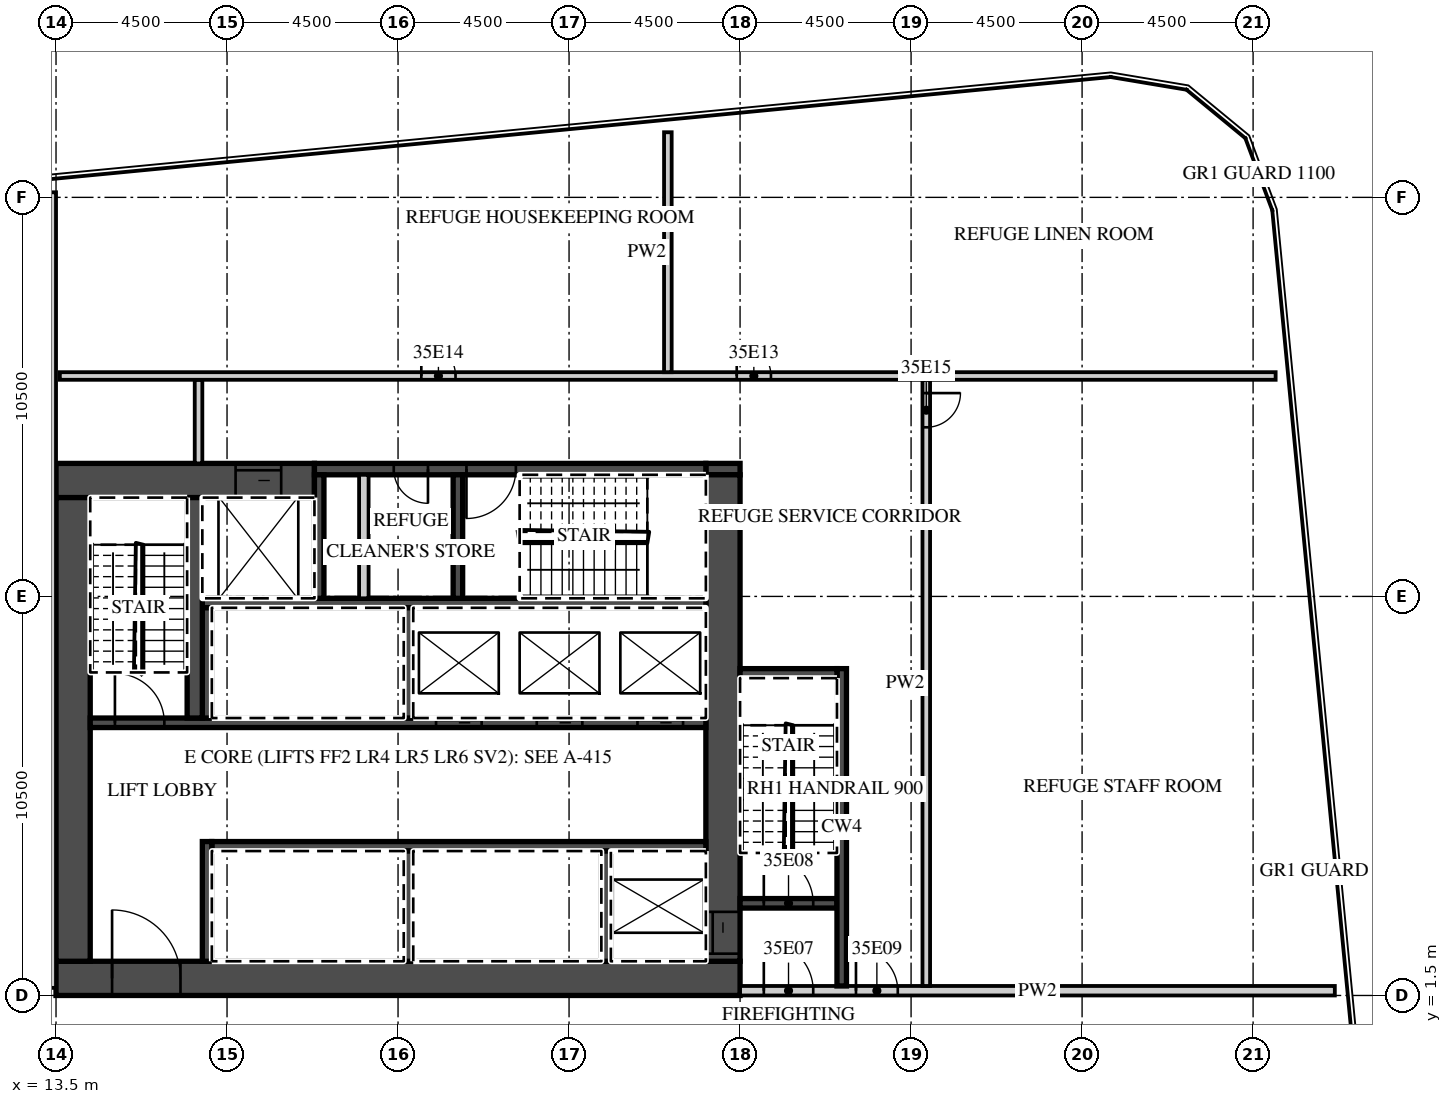
"""IFC4 building model, lengths in metres.
Left out: names, types, materials, properties, quantities, classifications, styles, units other than length and angle.
Written with IfcOpenShell. Run it as: python <this file> out.ifc"""

import sys

from ifc_helpers import new_model, si_unit, direction, frame, frame_2d, origin, place, context, subcontext, project, spatial, rectangle, extrude, element, fill, save


model = new_model("IFC4")
c1 = context("Model", 3, precision=1e-05, world=origin(), true_north=direction((0.0, 1.0)))
c2 = subcontext(c1, "Body", "Model", "MODEL_VIEW")
j1 = project(units=[si_unit("LENGTHUNIT", "METRE"), si_unit("PLANEANGLEUNIT", "RADIAN")], contexts=[c1])
p1 = place(None, origin())
s1 = spatial("IfcSite", under=j1, at=p1, CompositionType="ELEMENT")
p2 = place(p1, origin())
s2 = spatial("IfcBuilding", under=s1, at=p2, CompositionType="ELEMENT")
p3 = place(p2, frame((0.0, 0.0, 150.4)))
s3 = spatial("IfcBuildingStorey", under=s2, at=p3, CompositionType="ELEMENT", Elevation=150.4)
p4 = place(p3, frame((13.5, 1.95, 0.0), z_axis=(0.0, 0.0, 1.0), x_axis=(1.0, 0.0, 0.0)))
e1 = element("IfcWall", 1, at=p4, inside=s3, PredefinedType="SHEAR", context=c2, shape_type="SweptSolid", body=[
    extrude(rectangle(XDim=18.0, YDim=0.9, at=frame_2d((9.0, 0.0))), origin(), (0.0, 0.0, 1.0), 4.2),
])
p5 = place(p4, frame((1.475, 0.0, 0.0)))
e2 = element("IfcOpeningElement", 2, at=p5, cuts=e1, PredefinedType="OPENING", context=c2, shape_type="SweptSolid", body=[
    extrude(rectangle(XDim=1.8, YDim=2.1, at=frame_2d((0.9, 1.05))), frame((0.0, 0.46, 0.0), z_axis=(0.0, -1.0, 0.0), x_axis=(1.0, 0.0, 0.0)), (0.0, 0.0, 1.0), 0.92),
])
p6 = place(p3, frame((13.5, 15.05, 0.0), z_axis=(0.0, 0.0, 1.0), x_axis=(1.0, 0.0, 0.0)))
e3 = element("IfcWall", 3, at=p6, inside=s3, PredefinedType="SHEAR", context=c2, shape_type="SweptSolid", body=[
    extrude(rectangle(XDim=6.8, YDim=0.9, at=frame_2d((3.4, 0.0))), origin(), (0.0, 0.0, 1.0), 4.2),
])
p7 = place(p6, frame((4.725, 0.0, 0.0)))
e4 = element("IfcOpeningElement", 4, at=p7, cuts=e3, PredefinedType="OPENING", context=c2, shape_type="SweptSolid", body=[
    extrude(rectangle(XDim=1.2, YDim=2.1, at=frame_2d((0.6, 1.05))), frame((0.0, 0.46, 0.0), z_axis=(0.0, -1.0, 0.0), x_axis=(1.0, 0.0, 0.0)), (0.0, 0.0, 1.0), 0.92),
])
p8 = place(p3, frame((30.6, 15.35, 0.0), z_axis=(0.0, 0.0, 1.0), x_axis=(1.0, 0.0, 0.0)))
e5 = element("IfcWall", 5, at=p8, inside=s3, PredefinedType="SHEAR", context=c2, shape_type="SweptSolid", body=[
    extrude(rectangle(XDim=0.9, YDim=0.3, at=frame_2d((0.45, 0.0))), origin(), (0.0, 0.0, 1.0), 4.2),
])
p9 = place(p3, frame((20.3, 15.35, 0.0), z_axis=(0.0, 0.0, 1.0), x_axis=(1.0, 0.0, 0.0)))
e6 = element("IfcWall", 6, at=p9, inside=s3, PredefinedType="SHEAR", context=c2, shape_type="SweptSolid", body=[
    extrude(rectangle(XDim=10.3, YDim=0.3, at=frame_2d((5.15, 0.0))), origin(), (0.0, 0.0, 1.0), 4.2),
])
p10 = place(p9, frame((4.0, 0.0, 0.0)))
e7 = element("IfcOpeningElement", 7, at=p10, cuts=e6, PredefinedType="OPENING", context=c2, shape_type="SweptSolid", body=[
    extrude(rectangle(XDim=1.3, YDim=2.1, at=frame_2d((0.65, 1.05))), frame((0.0, 0.16, 0.0), z_axis=(0.0, -1.0, 0.0), x_axis=(1.0, 0.0, 0.0)), (0.0, 0.0, 1.0), 0.32),
])
p11 = place(p9, frame((2.087, 0.0, 0.0)))
e8 = element("IfcOpeningElement", 8, at=p11, cuts=e6, PredefinedType="OPENING", context=c2, shape_type="SweptSolid", body=[
    extrude(rectangle(XDim=0.9, YDim=2.1, at=frame_2d((0.45, 1.05))), frame((0.0, 0.16, 0.0), z_axis=(0.0, -1.0, 0.0), x_axis=(1.0, 0.0, 0.0)), (0.0, 0.0, 1.0), 0.32),
])
p12 = place(p3, frame((31.05, 2.4, 0.0), z_axis=(0.0, 0.0, 1.0), x_axis=(0.0, 1.0, 0.0)))
e9 = element("IfcWall", 9, at=p12, inside=s3, PredefinedType="SHEAR", context=c2, shape_type="SweptSolid", body=[
    extrude(rectangle(XDim=12.8, YDim=0.9, at=frame_2d((6.4, 0.0))), origin(), (0.0, 0.0, 1.0), 4.2),
])
p13 = place(p12, frame((0.2, 0.0, 0.0)))
e10 = element("IfcOpeningElement", 10, at=p13, cuts=e9, PredefinedType="OPENING", context=c2, shape_type="SweptSolid", body=[
    extrude(rectangle(XDim=1.1, YDim=2.1, at=frame_2d((0.55, 1.05))), frame((0.0, 0.46, 0.0), z_axis=(0.0, -1.0, 0.0), x_axis=(1.0, 0.0, 0.0)), (0.0, 0.0, 1.0), 0.92),
])
p14 = place(p3, frame((13.95, 2.4, 0.0), z_axis=(0.0, 0.0, 1.0), x_axis=(0.0, 1.0, 0.0)))
e11 = element("IfcWall", 11, at=p14, inside=s3, PredefinedType="SHEAR", context=c2, shape_type="SweptSolid", body=[
    extrude(rectangle(XDim=12.2, YDim=0.9, at=frame_2d((6.1, 0.0))), origin(), (0.0, 0.0, 1.0), 4.2),
])
p15 = place(p3, frame((17.6, 5.425, 0.0), z_axis=(0.0, 0.0, 1.0), x_axis=(1.0, 0.0, 0.0)))
e12 = element("IfcWall", 12, at=p15, inside=s3, PredefinedType="SHEAR", context=c2, shape_type="SweptSolid", body=[
    extrude(rectangle(XDim=13.0, YDim=0.25, at=frame_2d((6.5, 0.0))), origin(), (0.0, 0.0, 1.0), 4.2),
])
p16 = place(p3, frame((17.475, 2.4, 0.0), z_axis=(0.0, 0.0, 1.0), x_axis=(0.0, 1.0, 0.0)))
e13 = element("IfcWall", 13, at=p16, inside=s3, PredefinedType="SHEAR", context=c2, shape_type="SweptSolid", body=[
    extrude(rectangle(XDim=3.15, YDim=0.25, at=frame_2d((1.575, 0.0))), origin(), (0.0, 0.0, 1.0), 4.2),
])
for number, where, z_axis, x_axis in (
    (14, (27.975, 2.4, 0.0), (0.0, 0.0, 1.0), (0.0, 1.0, 0.0)),
    (15, (22.775, 2.4, 0.0), (0.0, 0.0, 1.0), (0.0, 1.0, 0.0)),
):
    element("IfcWall", number, at=place(p3, frame(where, z_axis=z_axis, x_axis=x_axis)), inside=s3, PredefinedType="SHEAR", context=c2, shape_type="SweptSolid", body=[
        extrude(rectangle(XDim=2.9, YDim=0.25, at=frame_2d((1.45, 0.0))), origin(), (0.0, 0.0, 1.0), 4.2),
    ])
p17 = place(p3, frame((14.4, 8.675, 0.0), z_axis=(0.0, 0.0, 1.0), x_axis=(1.0, 0.0, 0.0)))
e16 = element("IfcWall", 16, at=p17, inside=s3, PredefinedType="SHEAR", context=c2, shape_type="SweptSolid", body=[
    extrude(rectangle(XDim=16.2, YDim=0.25, at=frame_2d((8.1, 0.0))), origin(), (0.0, 0.0, 1.0), 4.2),
])
p18 = place(p17, frame((14.4, 0.0, 0.0)))
e17 = element("IfcOpeningElement", 17, at=p18, cuts=e16, PredefinedType="OPENING", context=c2, shape_type="SweptSolid", body=[
    extrude(rectangle(XDim=1.2, YDim=2.1, at=frame_2d((0.6, 1.05))), frame((0.0, 0.135, 0.0), z_axis=(0.0, -1.0, 0.0), x_axis=(1.0, 0.0, 0.0)), (0.0, 0.0, 1.0), 0.27),
])
p19 = place(p17, frame((11.75, 0.0, 0.0)))
e18 = element("IfcOpeningElement", 18, at=p19, cuts=e16, PredefinedType="OPENING", context=c2, shape_type="SweptSolid", body=[
    extrude(rectangle(XDim=1.2, YDim=2.1, at=frame_2d((0.6, 1.05))), frame((0.0, 0.135, 0.0), z_axis=(0.0, -1.0, 0.0), x_axis=(1.0, 0.0, 0.0)), (0.0, 0.0, 1.0), 0.27),
])
p20 = place(p17, frame((9.1, 0.0, 0.0)))
e19 = element("IfcOpeningElement", 19, at=p20, cuts=e16, PredefinedType="OPENING", context=c2, shape_type="SweptSolid", body=[
    extrude(rectangle(XDim=1.2, YDim=2.1, at=frame_2d((0.6, 1.05))), frame((0.0, 0.135, 0.0), z_axis=(0.0, -1.0, 0.0), x_axis=(1.0, 0.0, 0.0)), (0.0, 0.0, 1.0), 0.27),
])
p21 = place(p17, frame((0.65, 0.0, 0.0)))
e20 = element("IfcOpeningElement", 20, at=p21, cuts=e16, PredefinedType="OPENING", context=c2, shape_type="SweptSolid", body=[
    extrude(rectangle(XDim=1.3, YDim=2.1, at=frame_2d((0.65, 1.05))), frame((0.0, 0.135, 0.0), z_axis=(0.0, -1.0, 0.0), x_axis=(1.0, 0.0, 0.0)), (0.0, 0.0, 1.0), 0.27),
])
p22 = place(p3, frame((17.35, 11.825, 0.0), z_axis=(0.0, 0.0, 1.0), x_axis=(1.0, 0.0, 0.0)))
e21 = element("IfcWall", 21, at=p22, inside=s3, PredefinedType="SHEAR", context=c2, shape_type="SweptSolid", body=[
    extrude(rectangle(XDim=13.25, YDim=0.25, at=frame_2d((6.625, 0.0))), origin(), (0.0, 0.0, 1.0), 4.2),
])
for number, where, z_axis, x_axis in (
    (22, (17.475, 8.8, 0.0), (0.0, 0.0, 1.0), (0.0, 1.0, 0.0)),
    (23, (22.775, 8.8, 0.0), (0.0, 0.0, 1.0), (0.0, 1.0, 0.0)),
):
    element("IfcWall", number, at=place(p3, frame(where, z_axis=z_axis, x_axis=x_axis)), inside=s3, PredefinedType="SHEAR", context=c2, shape_type="SweptSolid", body=[
        extrude(rectangle(XDim=2.9, YDim=0.25, at=frame_2d((1.45, 0.0))), origin(), (0.0, 0.0, 1.0), 4.2),
    ])
p23 = place(p3, frame((17.15, 8.8, 0.0), z_axis=(0.0, 0.0, 1.0), x_axis=(0.0, 1.0, 0.0)))
e24 = element("IfcWall", 24, at=p23, inside=s3, PredefinedType="SHEAR", context=c2, shape_type="SweptSolid", body=[
    extrude(rectangle(XDim=5.8, YDim=0.4, at=frame_2d((2.9, 0.0))), origin(), (0.0, 0.0, 1.0), 4.2),
])
for number, where, z_axis, x_axis in (
    (25, (20.425, 11.95, 0.0), (0.0, 0.0, 1.0), (0.0, 1.0, 0.0)),
    (26, (24.075, 11.95, 0.0), (0.0, 0.0, 1.0), (0.0, 1.0, 0.0)),
):
    element("IfcWall", number, at=place(p3, frame(where, z_axis=z_axis, x_axis=x_axis)), inside=s3, PredefinedType="SHEAR", context=c2, shape_type="SweptSolid", body=[
        extrude(rectangle(XDim=3.25, YDim=0.25, at=frame_2d((1.625, 0.0))), origin(), (0.0, 0.0, 1.0), 4.2),
    ])
p24 = place(p3, frame((21.6, 11.95, 0.0), z_axis=(0.0, 0.0, 1.0), x_axis=(0.0, 1.0, 0.0)))
e27 = element("IfcWall", 27, at=p24, inside=s3, PredefinedType="PARTITIONING", context=c2, shape_type="SweptSolid", body=[
    extrude(rectangle(XDim=3.25, YDim=0.25, at=frame_2d((1.625, 0.0))), origin(), (0.0, 0.0, 1.0), 4.2),
])
p25 = place(p3, frame((31.5, 1.625, 0.0), z_axis=(0.0, 0.0, 1.0), x_axis=(1.0, 0.0, 0.0)))
e28 = element("IfcWall", 28, at=p25, inside=s3, PredefinedType="PARTITIONING", context=c2, shape_type="SweptSolid", body=[
    extrude(rectangle(XDim=15.65, YDim=0.25, at=frame_2d((7.825, 0.0))), origin(), (0.0, 0.0, 1.0), 4.2),
])
p26 = place(p25, frame((0.625, 0.0, 0.0)))
e29 = element("IfcOpeningElement", 29, at=p26, cuts=e28, PredefinedType="OPENING", context=c2, shape_type="SweptSolid", body=[
    extrude(rectangle(XDim=1.3, YDim=2.1, at=frame_2d((0.65, 1.05))), frame((0.0, 0.135, 0.0), z_axis=(0.0, -1.0, 0.0), x_axis=(1.0, 0.0, 0.0)), (0.0, 0.0, 1.0), 0.27),
])
p27 = place(p25, frame((3.05, 0.0, 0.0)))
e30 = element("IfcOpeningElement", 30, at=p27, cuts=e28, PredefinedType="OPENING", context=c2, shape_type="SweptSolid", body=[
    extrude(rectangle(XDim=1.1, YDim=2.1, at=frame_2d((0.55, 1.05))), frame((0.0, 0.135, 0.0), z_axis=(0.0, -1.0, 0.0), x_axis=(1.0, 0.0, 0.0)), (0.0, 0.0, 1.0), 0.27),
])
p28 = place(p3, frame((31.5, 3.925, 0.0), z_axis=(0.0, 0.0, 1.0), x_axis=(1.0, 0.0, 0.0)))
e31 = element("IfcWall", 31, at=p28, inside=s3, PredefinedType="SHEAR", context=c2, shape_type="SweptSolid", body=[
    extrude(rectangle(XDim=2.55, YDim=0.25, at=frame_2d((1.275, 0.0))), origin(), (0.0, 0.0, 1.0), 4.2),
])
p29 = place(p28, frame((0.625, 0.0, 0.0)))
e32 = element("IfcOpeningElement", 32, at=p29, cuts=e31, PredefinedType="OPENING", context=c2, shape_type="SweptSolid", body=[
    extrude(rectangle(XDim=1.3, YDim=2.1, at=frame_2d((0.65, 1.05))), frame((0.0, 0.135, 0.0), z_axis=(0.0, -1.0, 0.0), x_axis=(1.0, 0.0, 0.0)), (0.0, 0.0, 1.0), 0.27),
])
p30 = place(p3, frame((34.175, 1.75, 0.0), z_axis=(0.0, 0.0, 1.0), x_axis=(0.0, 1.0, 0.0)))
e33 = element("IfcWall", 33, at=p30, inside=s3, PredefinedType="SHEAR", context=c2, shape_type="SweptSolid", body=[
    extrude(rectangle(XDim=8.35, YDim=0.25, at=frame_2d((4.175, 0.0))), origin(), (0.0, 0.0, 1.0), 4.2),
])
p31 = place(p3, frame((31.5, 9.975, 0.0), z_axis=(0.0, 0.0, 1.0), x_axis=(1.0, 0.0, 0.0)))
e34 = element("IfcWall", 34, at=p31, inside=s3, PredefinedType="SHEAR", context=c2, shape_type="SweptSolid", body=[
    extrude(rectangle(XDim=2.55, YDim=0.25, at=frame_2d((1.275, 0.0))), origin(), (0.0, 0.0, 1.0), 4.2),
])
p32 = place(p3, frame((17.25, 15.5, 0.0), z_axis=(0.0, 0.0, 1.0), x_axis=(0.0, 1.0, 0.0)))
e35 = element("IfcWall", 35, at=p32, inside=s3, PredefinedType="PARTITIONING", context=c2, shape_type="SweptSolid", body=[
    extrude(rectangle(XDim=2.2, YDim=0.2, at=frame_2d((1.1, 0.0))), origin(), (0.0, 0.0, 1.0), 4.2),
])
p33 = place(p3, frame((36.4, 1.75, 0.0), z_axis=(0.0, 0.0, 1.0), x_axis=(0.0, 1.0, 0.0)))
e36 = element("IfcWall", 36, at=p33, inside=s3, PredefinedType="PARTITIONING", context=c2, shape_type="SweptSolid", body=[
    extrude(rectangle(XDim=15.95, YDim=0.2, at=frame_2d((7.975, 0.0))), origin(), (0.0, 0.0, 1.0), 4.2),
])
p34 = place(p33, frame((14.7, 0.0, 0.0)))
e37 = element("IfcOpeningElement", 37, at=p34, cuts=e36, PredefinedType="OPENING", context=c2, shape_type="SweptSolid", body=[
    extrude(rectangle(XDim=0.9, YDim=2.1, at=frame_2d((0.45, 1.05))), frame((0.0, 0.11, 0.0), z_axis=(0.0, -1.0, 0.0), x_axis=(1.0, 0.0, 0.0)), (0.0, 0.0, 1.0), 0.22),
])
p35 = place(p3, frame((13.6, 17.8, 0.0), z_axis=(0.0, 0.0, 1.0), x_axis=(1.0, 0.0, 0.0)))
e38 = element("IfcWall", 38, at=p35, inside=s3, PredefinedType="PARTITIONING", context=c2, shape_type="SweptSolid", body=[
    extrude(rectangle(XDim=31.993, YDim=0.2, at=frame_2d((15.997, 0.0))), origin(), (0.0, 0.0, 1.0), 4.2),
])
p36 = place(p35, frame((17.812, 0.0, 0.0)))
e39 = element("IfcOpeningElement", 39, at=p36, cuts=e38, PredefinedType="OPENING", context=c2, shape_type="SweptSolid", body=[
    extrude(rectangle(XDim=0.9, YDim=2.1, at=frame_2d((0.45, 1.05))), frame((0.0, 0.11, 0.0), z_axis=(0.0, -1.0, 0.0), x_axis=(1.0, 0.0, 0.0)), (0.0, 0.0, 1.0), 0.22),
])
p37 = place(p35, frame((9.512, 0.0, 0.0)))
e40 = element("IfcOpeningElement", 40, at=p37, cuts=e38, PredefinedType="OPENING", context=c2, shape_type="SweptSolid", body=[
    extrude(rectangle(XDim=0.9, YDim=2.1, at=frame_2d((0.45, 1.05))), frame((0.0, 0.11, 0.0), z_axis=(0.0, -1.0, 0.0), x_axis=(1.0, 0.0, 0.0)), (0.0, 0.0, 1.0), 0.22),
])
p38 = place(p3, frame((29.6, 17.9, 0.0), z_axis=(0.0, 0.0, 1.0), x_axis=(0.0, 1.0, 0.0)))
e41 = element("IfcWall", 41, at=p38, inside=s3, PredefinedType="PARTITIONING", context=c2, shape_type="SweptSolid", body=[
    extrude(rectangle(XDim=6.313, YDim=0.2, at=frame_2d((3.157, 0.0))), origin(), (0.0, 0.0, 1.0), 4.2),
])
p39 = place(p3, frame((13.4, 1.7, 0.0), z_axis=(0.0, 0.0, 1.0), x_axis=(0.0, 1.0, 0.0)))
e42 = element("IfcWall", 42, at=p39, inside=s3, PredefinedType="PARTITIONING", context=c2, shape_type="SweptSolid", body=[
    extrude(rectangle(XDim=20.933, YDim=0.2, at=frame_2d((10.467, 0.0))), origin(), (0.0, 0.0, 1.0), 4.2),
])
p40 = place(p18, origin())
e43 = element("IfcDoor", 43, at=p40, inside=s3, OperationType="SLIDING_TO_LEFT", PredefinedType="DOOR", context=c2, shape_type="SweptSolid", body=[
    extrude(rectangle(XDim=1.2, YDim=2.1, at=frame_2d((0.6, 1.05))), frame((0.0, 0.025, 0.0), z_axis=(0.0, -1.0, 0.0), x_axis=(1.0, 0.0, 0.0)), (0.0, 0.0, 1.0), 0.05),
])
fill(e17, e43)
p41 = place(p19, origin())
e44 = element("IfcDoor", 44, at=p41, inside=s3, OperationType="SLIDING_TO_RIGHT", PredefinedType="DOOR", context=c2, shape_type="SweptSolid", body=[
    extrude(rectangle(XDim=1.2, YDim=2.1, at=frame_2d((0.6, 1.05))), frame((0.0, 0.025, 0.0), z_axis=(0.0, -1.0, 0.0), x_axis=(1.0, 0.0, 0.0)), (0.0, 0.0, 1.0), 0.05),
])
fill(e18, e44)
p42 = place(p20, origin())
e45 = element("IfcDoor", 45, at=p42, inside=s3, OperationType="SLIDING_TO_RIGHT", PredefinedType="DOOR", context=c2, shape_type="SweptSolid", body=[
    extrude(rectangle(XDim=1.2, YDim=2.1, at=frame_2d((0.6, 1.05))), frame((0.0, 0.025, 0.0), z_axis=(0.0, -1.0, 0.0), x_axis=(1.0, 0.0, 0.0)), (0.0, 0.0, 1.0), 0.05),
])
fill(e19, e45)
p43 = place(p7, origin())
e46 = element("IfcDoor", 46, at=p43, inside=s3, OperationType="SLIDING_TO_LEFT", PredefinedType="DOOR", context=c2, shape_type="SweptSolid", body=[
    extrude(rectangle(XDim=1.2, YDim=2.1, at=frame_2d((0.6, 1.05))), frame((0.0, 0.025, 0.0), z_axis=(0.0, -1.0, 0.0), x_axis=(1.0, 0.0, 0.0)), (0.0, 0.0, 1.0), 0.05),
])
fill(e4, e46)
p44 = place(p13, origin())
e47 = element("IfcDoor", 47, at=p44, inside=s3, OperationType="SLIDING_TO_LEFT", PredefinedType="DOOR", context=c2, shape_type="SweptSolid", body=[
    extrude(rectangle(XDim=1.1, YDim=2.1, at=frame_2d((0.55, 1.05))), frame((0.0, 0.025, 0.0), z_axis=(0.0, -1.0, 0.0), x_axis=(1.0, 0.0, 0.0)), (0.0, 0.0, 1.0), 0.05),
])
fill(e10, e47)
p45 = place(p5, origin())
e48 = element("IfcDoor", 48, at=p45, inside=s3, OperationType="DOUBLE_DOOR_DOUBLE_SWING", PredefinedType="DOOR", context=c2, shape_type="SweptSolid", body=[
    extrude(rectangle(XDim=1.8, YDim=2.1, at=frame_2d((0.9, 1.05))), frame((0.0, 0.025, 0.0), z_axis=(0.0, -1.0, 0.0), x_axis=(1.0, 0.0, 0.0)), (0.0, 0.0, 1.0), 0.05),
])
fill(e2, e48)
p46 = place(p26, origin())
e49 = element("IfcDoor", 49, at=p46, inside=s3, OperationType="SINGLE_SWING_LEFT", PredefinedType="DOOR", context=c2, shape_type="SweptSolid", body=[
    extrude(rectangle(XDim=1.3, YDim=2.1, at=frame_2d((0.65, 1.05))), frame((0.0, 0.025, 0.0), z_axis=(0.0, -1.0, 0.0), x_axis=(1.0, 0.0, 0.0)), (0.0, 0.0, 1.0), 0.05),
])
fill(e29, e49)
p47 = place(p29, origin())
e50 = element("IfcDoor", 50, at=p47, inside=s3, OperationType="SINGLE_SWING_LEFT", PredefinedType="DOOR", context=c2, shape_type="SweptSolid", body=[
    extrude(rectangle(XDim=1.3, YDim=2.1, at=frame_2d((0.65, 1.05))), frame((0.0, 0.025, 0.0), z_axis=(0.0, -1.0, 0.0), x_axis=(1.0, 0.0, 0.0)), (0.0, 0.0, 1.0), 0.05),
])
fill(e32, e50)
p48 = place(p27, origin())
e51 = element("IfcDoor", 51, at=p48, inside=s3, OperationType="SINGLE_SWING_LEFT", PredefinedType="DOOR", context=c2, shape_type="SweptSolid", body=[
    extrude(rectangle(XDim=1.1, YDim=2.1, at=frame_2d((0.55, 1.05))), frame((0.0, 0.025, 0.0), z_axis=(0.0, -1.0, 0.0), x_axis=(1.0, 0.0, 0.0)), (0.0, 0.0, 1.0), 0.05),
])
fill(e30, e51)
p49 = place(p21, origin())
e52 = element("IfcDoor", 52, at=p49, inside=s3, OperationType="SINGLE_SWING_LEFT", PredefinedType="DOOR", context=c2, shape_type="SweptSolid", body=[
    extrude(rectangle(XDim=1.3, YDim=2.1, at=frame_2d((0.65, 1.05))), frame((0.0, 0.025, 0.0), z_axis=(0.0, -1.0, 0.0), x_axis=(1.0, 0.0, 0.0)), (0.0, 0.0, 1.0), 0.05),
])
fill(e20, e52)
p50 = place(p10, origin())
e53 = element("IfcDoor", 53, at=p50, inside=s3, OperationType="SINGLE_SWING_LEFT", PredefinedType="DOOR", context=c2, shape_type="SweptSolid", body=[
    extrude(rectangle(XDim=1.3, YDim=2.1, at=frame_2d((0.65, 1.05))), frame((0.0, 0.025, 0.0), z_axis=(0.0, -1.0, 0.0), x_axis=(1.0, 0.0, 0.0)), (0.0, 0.0, 1.0), 0.05),
])
fill(e7, e53)
p51 = place(p11, origin())
e54 = element("IfcDoor", 54, at=p51, inside=s3, OperationType="SINGLE_SWING_RIGHT", PredefinedType="DOOR", context=c2, shape_type="SweptSolid", body=[
    extrude(rectangle(XDim=0.9, YDim=2.1, at=frame_2d((0.45, 1.05))), frame((0.0, 0.025, 0.0), z_axis=(0.0, -1.0, 0.0), x_axis=(1.0, 0.0, 0.0)), (0.0, 0.0, 1.0), 0.05),
])
fill(e8, e54)
p52 = place(p36, origin())
e55 = element("IfcDoor", 55, at=p52, inside=s3, OperationType="SINGLE_SWING_LEFT", PredefinedType="DOOR", context=c2, shape_type="SweptSolid", body=[
    extrude(rectangle(XDim=0.9, YDim=2.1, at=frame_2d((0.45, 1.05))), frame((0.0, 0.025, 0.0), z_axis=(0.0, -1.0, 0.0), x_axis=(1.0, 0.0, 0.0)), (0.0, 0.0, 1.0), 0.05),
])
fill(e39, e55)
p53 = place(p37, origin())
e56 = element("IfcDoor", 56, at=p53, inside=s3, OperationType="SINGLE_SWING_LEFT", PredefinedType="DOOR", context=c2, shape_type="SweptSolid", body=[
    extrude(rectangle(XDim=0.9, YDim=2.1, at=frame_2d((0.45, 1.05))), frame((0.0, 0.025, 0.0), z_axis=(0.0, -1.0, 0.0), x_axis=(1.0, 0.0, 0.0)), (0.0, 0.0, 1.0), 0.05),
])
fill(e40, e56)
p54 = place(p34, origin())
e57 = element("IfcDoor", 57, at=p54, inside=s3, OperationType="SINGLE_SWING_RIGHT", PredefinedType="DOOR", context=c2, shape_type="SweptSolid", body=[
    extrude(rectangle(XDim=0.9, YDim=2.1, at=frame_2d((0.45, 1.05))), frame((0.0, 0.025, 0.0), z_axis=(0.0, -1.0, 0.0), x_axis=(1.0, 0.0, 0.0)), (0.0, 0.0, 1.0), 0.05),
])
fill(e37, e57)
save(model, sys.argv[1])
